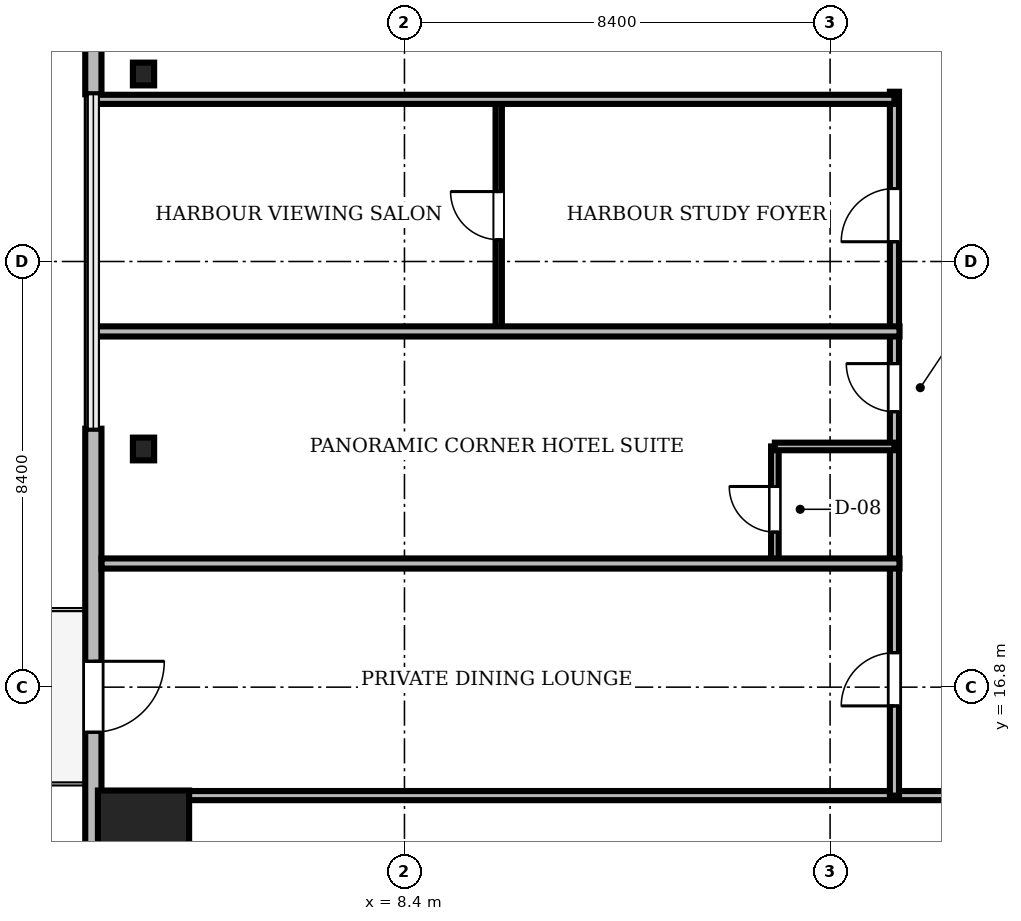
"""IFC4 building model, lengths in metres.
Left out: names, types, materials, properties, quantities, classifications, styles, units other than length and angle.
Written with IfcOpenShell. Run it as: python <this file> out.ifc"""

import sys

from ifc_helpers import new_model, si_unit, direction, frame, frame_2d, origin, origin_2d, place, context, subcontext, project, spatial, rectangle, i_section, extrude, source, transform, mapped, element, fill, save


model = new_model("IFC4")
c1 = context("Model", 3, precision=1e-05, world=origin(), true_north=direction((0.0, 1.0)))
c2 = subcontext(c1, "Body", "Model", "MODEL_VIEW")
j1 = project(units=[si_unit("LENGTHUNIT", "METRE"), si_unit("PLANEANGLEUNIT", "RADIAN")], contexts=[c1])
p1 = place(None, origin())
s1 = spatial("IfcSite", under=j1, at=p1, CompositionType="ELEMENT")
p2 = place(p1, origin())
s2 = spatial("IfcBuilding", under=s1, at=p2, CompositionType="ELEMENT")
p3 = place(p2, frame((0.0, 0.0, 89.65)))
s3 = spatial("IfcBuildingStorey", under=s2, at=p3, CompositionType="ELEMENT", Elevation=89.65)
m1 = source(origin(), c2, "Body", "SweptSolid", [
    extrude(rectangle(XDim=1.8, YDim=1.8, at=origin_2d()), origin(), (0.0, 0.0, 1.0), 3.0),
])
p4 = place(p3, frame((3.25, 13.86, 0.0), z_axis=(0.0, 0.0, 1.0), x_axis=(1.0, 0.0, 0.0)))
e1 = element("IfcColumn", 1, at=p4, inside=s3, PredefinedType="COLUMN", context=c2, shape_type="MappedRepresentation", body=[
    mapped(m1, transform((0.0, 0.0, 0.0), scale=1.0)),
])
m2 = source(origin(), c2, "Body", "SweptSolid", [
    extrude(i_section(OverallWidth=0.419, OverallDepth=0.449, WebThickness=0.031, FlangeThickness=0.048, FilletRadius=0.015, at=origin_2d()), origin(), (0.0, 0.0, 1.0), 3.0),
])
for number, where, z_axis, x_axis in (
    (2, (3.25, 28.9, 0.0), (0.0, 0.0, 1.0), (1.0, 0.0, 0.0)),
    (3, (3.25, 21.5, 0.0), (0.0, 0.0, 1.0), (1.0, 0.0, 0.0)),
):
    element("IfcColumn", number, at=place(p3, frame(where, z_axis=z_axis, x_axis=x_axis)), inside=s3, PredefinedType="COLUMN", context=c2, shape_type="MappedRepresentation", body=[
        mapped(m2, transform((0.0, 0.0, 0.0), scale=1.0)),
    ])
m3 = source(origin(), c2, "Body", "SweptSolid", [
    extrude(rectangle(XDim=15.6, YDim=0.32, at=frame_2d((7.8, 0.0))), origin(), (0.0, 0.0, 1.0), 3.0),
])
p5 = place(p3, frame((2.26, 44.1, 0.0), z_axis=(0.0, 0.0, 1.0), x_axis=(0.0, -1.0, 0.0)))
e4 = element("IfcWall", 4, at=p5, inside=s3, PredefinedType="SOLIDWALL", context=c2, shape_type="MappedRepresentation", body=[
    mapped(m3, transform((0.0, 0.0, 0.0), scale=1.0)),
])
m4 = source(origin(), c2, "Body", "SweptSolid", [
    extrude(rectangle(XDim=2.2, YDim=2.4, at=frame_2d((1.1, 1.2))), frame((0.0, 0.17, 0.0), z_axis=(0.0, -1.0, 0.0), x_axis=(1.0, 0.0, 0.0)), (0.0, 0.0, 1.0), 0.34),
])
p6 = place(p5, frame((3.005, 0.0, 0.35)))
e5 = element("IfcOpeningElement", 5, at=p6, cuts=e4, PredefinedType="OPENING", context=c2, shape_type="MappedRepresentation", body=[
    mapped(m4, transform((0.0, 0.0, 0.0), scale=1.0)),
])
m5 = source(origin(), c2, "Body", "SweptSolid", [
    extrude(rectangle(XDim=15.6, YDim=0.32, at=frame_2d((7.8, 0.0))), origin(), (0.0, 0.0, 1.0), 3.0),
])
p7 = place(p3, frame((2.26, 21.9, 0.0), z_axis=(0.0, 0.0, 1.0), x_axis=(0.0, -1.0, 0.0)))
e6 = element("IfcWall", 6, at=p7, inside=s3, PredefinedType="SOLIDWALL", context=c2, shape_type="MappedRepresentation", body=[
    mapped(m5, transform((0.0, 0.0, 0.0), scale=1.0)),
])
m6 = source(origin(), c2, "Body", "SweptSolid", [
    extrude(rectangle(XDim=1.4, YDim=2.3, at=frame_2d((0.7, 1.15))), frame((0.0, 0.17, 0.0), z_axis=(0.0, -1.0, 0.0), x_axis=(1.0, 0.0, 0.0)), (0.0, 0.0, 1.0), 0.34),
])
p8 = place(p7, frame((4.59, 0.0, 0.0)))
e7 = element("IfcOpeningElement", 7, at=p8, cuts=e6, PredefinedType="OPENING", context=c2, shape_type="MappedRepresentation", body=[
    mapped(m6, transform((0.0, 0.0, 0.0), scale=1.0)),
])
p9 = place(p7, frame((10.395, 0.0, 0.35)))
e8 = element("IfcOpeningElement", 8, at=p9, cuts=e6, PredefinedType="OPENING", context=c2, shape_type="MappedRepresentation", body=[
    mapped(m4, transform((0.0, 0.0, 0.0), scale=1.0)),
])
m7 = source(origin(), c2, "Body", "SweptSolid", [
    extrude(rectangle(XDim=46.156, YDim=0.18, at=frame_2d((23.078, 0.0))), origin(), (0.0, 0.0, 1.0), 2.276),
])
p10 = place(p3, frame((2.422, 14.66, 0.0), z_axis=(0.0, 0.0, 1.0), x_axis=(1.0, 0.0, 0.0)))
e9 = element("IfcWall", 9, at=p10, inside=s3, PredefinedType="PARTITIONING", context=c2, shape_type="MappedRepresentation", body=[
    mapped(m7, transform((0.0, 0.0, 0.0), scale=1.0)),
])
m8 = source(origin(), c2, "Body", "SweptSolid", [
    extrude(rectangle(XDim=1.05, YDim=2.2, at=frame_2d((0.525, 1.1))), frame((0.0, 0.1, 0.0), z_axis=(0.0, -1.0, 0.0), x_axis=(1.0, 0.0, 0.0)), (0.0, 0.0, 1.0), 0.2),
])
p11 = place(p10, frame((16.668, 0.0, 0.0)))
e10 = element("IfcOpeningElement", 10, at=p11, cuts=e9, PredefinedType="OPENING", context=c2, shape_type="MappedRepresentation", body=[
    mapped(m8, transform((0.0, 0.0, 0.0), scale=1.0)),
])
p12 = place(p10, frame((19.36, 0.0, 0.0)))
e11 = element("IfcOpeningElement", 11, at=p12, cuts=e9, PredefinedType="OPENING", context=c2, shape_type="MappedRepresentation", body=[
    mapped(m8, transform((0.0, 0.0, 0.0), scale=1.0)),
])
p13 = place(p10, frame((23.085, 0.0, 0.0)))
e12 = element("IfcOpeningElement", 12, at=p13, cuts=e9, PredefinedType="OPENING", context=c2, shape_type="MappedRepresentation", body=[
    mapped(m8, transform((0.0, 0.0, 0.0), scale=1.0)),
])
p14 = place(p10, frame((26.809, 0.0, 0.0)))
e13 = element("IfcOpeningElement", 13, at=p14, cuts=e9, PredefinedType="OPENING", context=c2, shape_type="MappedRepresentation", body=[
    mapped(m8, transform((0.0, 0.0, 0.0), scale=1.0)),
])
p15 = place(p10, frame((30.534, 0.0, 0.0)))
e14 = element("IfcOpeningElement", 14, at=p15, cuts=e9, PredefinedType="OPENING", context=c2, shape_type="MappedRepresentation", body=[
    mapped(m8, transform((0.0, 0.0, 0.0), scale=1.0)),
])
p16 = place(p10, frame((34.259, 0.0, 0.0)))
e15 = element("IfcOpeningElement", 15, at=p16, cuts=e9, PredefinedType="OPENING", context=c2, shape_type="MappedRepresentation", body=[
    mapped(m8, transform((0.0, 0.0, 0.0), scale=1.0)),
])
p17 = place(p10, frame((37.983, 0.0, 0.0)))
e16 = element("IfcOpeningElement", 16, at=p17, cuts=e9, PredefinedType="OPENING", context=c2, shape_type="MappedRepresentation", body=[
    mapped(m8, transform((0.0, 0.0, 0.0), scale=1.0)),
])
p18 = place(p10, frame((42.727, 0.0, 0.0)))
e17 = element("IfcOpeningElement", 17, at=p18, cuts=e9, PredefinedType="OPENING", context=c2, shape_type="MappedRepresentation", body=[
    mapped(m8, transform((0.0, 0.0, 0.0), scale=1.0)),
])
m9 = source(origin(), c2, "Body", "SweptSolid", [
    extrude(rectangle(XDim=13.89, YDim=0.18, at=frame_2d((6.945, 0.0))), origin(), (0.0, 0.0, 1.0), 2.442),
])
p19 = place(p3, frame((18.07, 14.66, 0.0), z_axis=(0.0, 0.0, 1.0), x_axis=(0.0, 1.0, 0.0)))
e18 = element("IfcWall", 18, at=p19, inside=s3, PredefinedType="PARTITIONING", context=c2, shape_type="MappedRepresentation", body=[
    mapped(m9, transform((0.0, 0.0, 0.0), scale=1.0)),
])
p20 = place(p19, frame((1.77, 0.0, 0.0)))
e19 = element("IfcOpeningElement", 19, at=p20, cuts=e18, PredefinedType="OPENING", context=c2, shape_type="MappedRepresentation", body=[
    mapped(m8, transform((0.0, 0.0, 0.0), scale=1.0)),
])
m10 = source(origin(), c2, "Body", "SweptSolid", [
    extrude(rectangle(XDim=0.95, YDim=2.15, at=frame_2d((0.475, 1.075))), frame((0.0, 0.1, 0.0), z_axis=(0.0, -1.0, 0.0), x_axis=(1.0, 0.0, 0.0)), (0.0, 0.0, 1.0), 0.2),
])
p21 = place(p19, frame((7.575, 0.0, 0.0)))
e20 = element("IfcOpeningElement", 20, at=p21, cuts=e18, PredefinedType="OPENING", context=c2, shape_type="MappedRepresentation", body=[
    mapped(m10, transform((0.0, 0.0, 0.0), scale=1.0)),
])
p22 = place(p19, frame((10.93, 0.0, 0.0)))
e21 = element("IfcOpeningElement", 21, at=p22, cuts=e18, PredefinedType="OPENING", context=c2, shape_type="MappedRepresentation", body=[
    mapped(m8, transform((0.0, 0.0, 0.0), scale=1.0)),
])
m11 = source(origin(), c2, "Body", "SweptSolid", [
    extrude(rectangle(XDim=4.58, YDim=0.125, at=frame_2d((2.29, 0.0))), origin(), (0.0, 0.0, 1.0), 2.442),
])
p23 = place(p3, frame((10.26, 23.82, 0.0), z_axis=(0.0, 0.0, 1.0), x_axis=(0.0, 1.0, 0.0)))
e22 = element("IfcWall", 22, at=p23, inside=s3, PredefinedType="PARTITIONING", context=c2, shape_type="MappedRepresentation", body=[
    mapped(m11, transform((0.0, 0.0, 0.0), scale=1.0)),
])
m12 = source(origin(), c2, "Body", "SweptSolid", [
    extrude(rectangle(XDim=0.95, YDim=2.15, at=frame_2d((0.475, 1.075))), frame((0.0, 0.073, 0.0), z_axis=(0.0, -1.0, 0.0), x_axis=(1.0, 0.0, 0.0)), (0.0, 0.0, 1.0), 0.145),
])
p24 = place(p23, frame((1.81, 0.0, 0.0)))
e23 = element("IfcOpeningElement", 23, at=p24, cuts=e22, PredefinedType="OPENING", context=c2, shape_type="MappedRepresentation", body=[
    mapped(m12, transform((0.0, 0.0, 0.0), scale=1.0)),
])
m13 = source(origin(), c2, "Body", "SweptSolid", [
    extrude(rectangle(XDim=2.29, YDim=0.15, at=frame_2d((1.145, 0.0))), origin(), (0.0, 0.0, 1.0), 2.442),
])
p25 = place(p3, frame((15.71, 19.26, 0.0), z_axis=(0.0, 0.0, 1.0), x_axis=(0.0, 1.0, 0.0)))
e24 = element("IfcWall", 24, at=p25, inside=s3, PredefinedType="PARTITIONING", context=c2, shape_type="MappedRepresentation", body=[
    mapped(m13, transform((0.0, 0.0, 0.0), scale=1.0)),
])
m14 = source(origin(), c2, "Body", "SweptSolid", [
    extrude(rectangle(XDim=0.9, YDim=2.1, at=frame_2d((0.45, 1.05))), frame((0.0, 0.085, 0.0), z_axis=(0.0, -1.0, 0.0), x_axis=(1.0, 0.0, 0.0)), (0.0, 0.0, 1.0), 0.17),
])
p26 = place(p25, frame((0.6, 0.0, 0.0)))
e25 = element("IfcOpeningElement", 25, at=p26, cuts=e24, PredefinedType="OPENING", context=c2, shape_type="MappedRepresentation", body=[
    mapped(m14, transform((0.0, 0.0, 0.0), scale=1.0)),
])
m15 = source(origin(), c2, "Body", "SweptSolid", [
    extrude(rectangle(XDim=15.748, YDim=0.2, at=frame_2d((7.874, 0.0))), origin(), (0.0, 0.0, 1.0), 2.276),
])
p27 = place(p3, frame((2.422, 19.24, 0.0), z_axis=(0.0, 0.0, 1.0), x_axis=(1.0, 0.0, 0.0)))
e26 = element("IfcWall", 26, at=p27, inside=s3, PredefinedType="PARTITIONING", context=c2, shape_type="MappedRepresentation", body=[
    mapped(m15, transform((0.0, 0.0, 0.0), scale=1.0)),
])
m16 = source(origin(), c2, "Body", "SweptSolid", [
    extrude(rectangle(XDim=15.94, YDim=0.2, at=frame_2d((7.97, 0.0))), origin(), (0.0, 0.0, 1.0), 2.276),
])
p28 = place(p3, frame((2.23, 23.82, 0.0), z_axis=(0.0, 0.0, 1.0), x_axis=(1.0, 0.0, 0.0)))
e27 = element("IfcWall", 27, at=p28, inside=s3, PredefinedType="PARTITIONING", context=c2, shape_type="MappedRepresentation", body=[
    mapped(m16, transform((0.0, 0.0, 0.0), scale=1.0)),
])
m17 = source(origin(), c2, "Body", "SweptSolid", [
    extrude(rectangle(XDim=15.84, YDim=0.18, at=frame_2d((7.92, 0.0))), origin(), (0.0, 0.0, 1.0), 2.276),
])
p29 = place(p3, frame((2.23, 28.4, 0.0), z_axis=(0.0, 0.0, 1.0), x_axis=(1.0, 0.0, 0.0)))
e28 = element("IfcWall", 28, at=p29, inside=s3, PredefinedType="PARTITIONING", context=c2, shape_type="MappedRepresentation", body=[
    mapped(m17, transform((0.0, 0.0, 0.0), scale=1.0)),
])
m18 = source(origin(), c2, "Body", "SweptSolid", [
    extrude(rectangle(XDim=2.36, YDim=0.15, at=frame_2d((1.18, 0.0))), origin(), (0.0, 0.0, 1.0), 3.0),
])
p30 = place(p3, frame((15.71, 21.55, 0.0), z_axis=(0.0, 0.0, 1.0), x_axis=(1.0, 0.0, 0.0)))
e29 = element("IfcWall", 29, at=p30, inside=s3, PredefinedType="PARTITIONING", context=c2, shape_type="MappedRepresentation", body=[
    mapped(m18, transform((0.0, 0.0, 0.0), scale=1.0)),
])
m19 = source(origin(), c2, "Body", "SweptSolid", [
    extrude(rectangle(XDim=1.4, YDim=2.3, at=frame_2d((0.7, 1.15))), frame((0.0, 0.025, 0.0), z_axis=(0.0, -1.0, 0.0), x_axis=(1.0, 0.0, 0.0)), (0.0, 0.0, 1.0), 0.05),
])
p31 = place(p8, frame((1.4, 0.0, 0.0), z_axis=(0.0, 0.0, 1.0), x_axis=(-1.0, 0.0, 0.0)))
e30 = element("IfcDoor", 30, at=p31, inside=s3, OperationType="DOUBLE_DOOR_SLIDING", PredefinedType="DOOR", context=c2, shape_type="MappedRepresentation", body=[
    mapped(m19, transform((0.0, 0.0, 0.0), scale=1.0)),
])
fill(e7, e30)
m20 = source(origin(), c2, "Body", "SweptSolid", [
    extrude(rectangle(XDim=1.05, YDim=2.2, at=frame_2d((0.525, 1.1))), frame((0.0, 0.025, 0.0), z_axis=(0.0, -1.0, 0.0), x_axis=(1.0, 0.0, 0.0)), (0.0, 0.0, 1.0), 0.05),
])
p32 = place(p20, origin())
e31 = element("IfcDoor", 31, at=p32, inside=s3, OperationType="SINGLE_SWING_LEFT", PredefinedType="DOOR", context=c2, shape_type="MappedRepresentation", body=[
    mapped(m20, transform((0.0, 0.0, 0.0), scale=1.0)),
])
fill(e19, e31)
m21 = source(origin(), c2, "Body", "SweptSolid", [
    extrude(rectangle(XDim=0.95, YDim=2.15, at=frame_2d((0.475, 1.075))), frame((0.0, 0.025, 0.0), z_axis=(0.0, -1.0, 0.0), x_axis=(1.0, 0.0, 0.0)), (0.0, 0.0, 1.0), 0.05),
])
p33 = place(p21, origin())
e32 = element("IfcDoor", 32, at=p33, inside=s3, OperationType="SINGLE_SWING_RIGHT", PredefinedType="DOOR", context=c2, shape_type="MappedRepresentation", body=[
    mapped(m21, transform((0.0, 0.0, 0.0), scale=1.0)),
])
fill(e20, e32)
p34 = place(p22, origin())
e33 = element("IfcDoor", 33, at=p34, inside=s3, OperationType="SINGLE_SWING_LEFT", PredefinedType="DOOR", context=c2, shape_type="MappedRepresentation", body=[
    mapped(m20, transform((0.0, 0.0, 0.0), scale=1.0)),
])
fill(e21, e33)
p35 = place(p24, origin())
e34 = element("IfcDoor", 34, at=p35, inside=s3, OperationType="SINGLE_SWING_RIGHT", PredefinedType="DOOR", context=c2, shape_type="MappedRepresentation", body=[
    mapped(m21, transform((0.0, 0.0, 0.0), scale=1.0)),
])
fill(e23, e34)
m22 = source(origin(), c2, "Body", "SweptSolid", [
    extrude(rectangle(XDim=0.9, YDim=2.1, at=frame_2d((0.45, 1.05))), frame((0.0, 0.025, 0.0), z_axis=(0.0, -1.0, 0.0), x_axis=(1.0, 0.0, 0.0)), (0.0, 0.0, 1.0), 0.05),
])
p36 = place(p26, origin())
e35 = element("IfcDoor", 35, at=p36, inside=s3, OperationType="SINGLE_SWING_RIGHT", PredefinedType="DOOR", context=c2, shape_type="MappedRepresentation", body=[
    mapped(m22, transform((0.0, 0.0, 0.0), scale=1.0)),
])
fill(e25, e35)
save(model, sys.argv[1])
